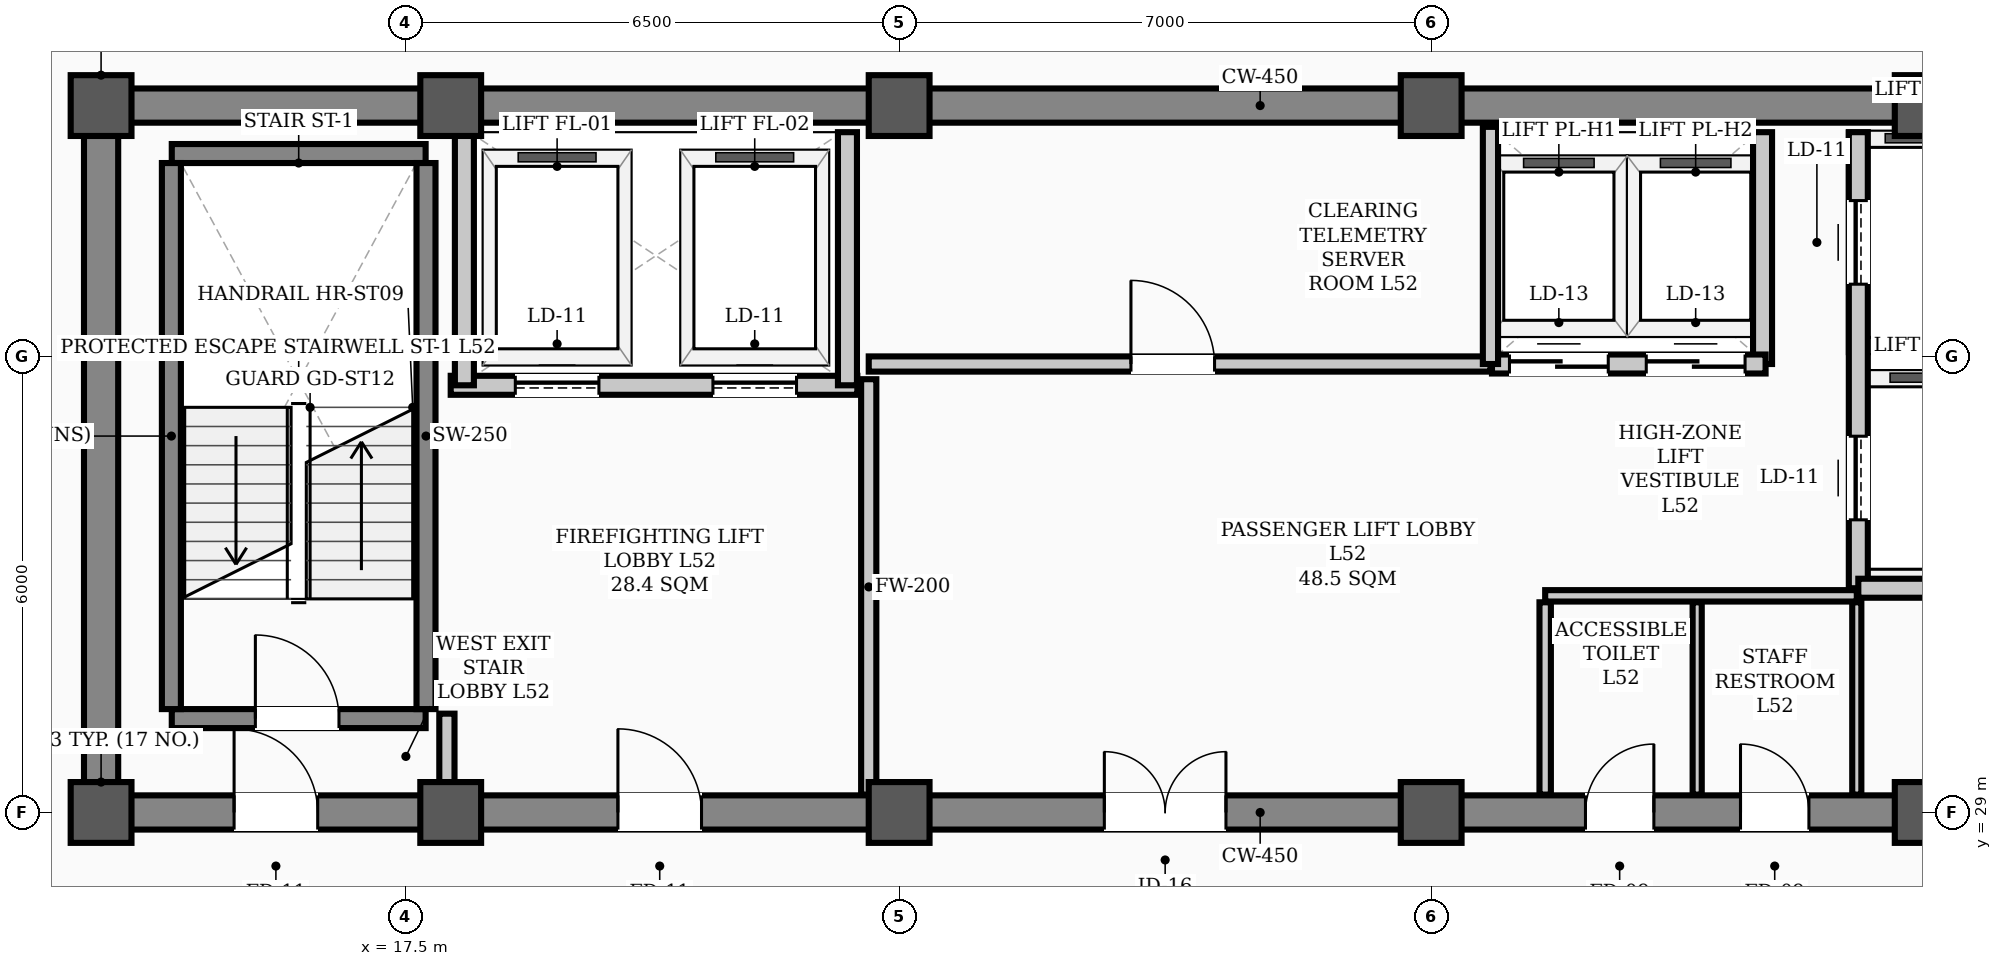
"""IFC4 building model, lengths in metres.
Left out: names, types, materials, properties, quantities, classifications, styles, units other than length and angle.
Written with IfcOpenShell. Run it as: python <this file> out.ifc"""

import sys

from ifc_helpers import new_model, si_unit, direction, frame, frame_2d, origin, origin_2d, place, context, subcontext, project, spatial, rectangle, hollow_rectangle, extrude, element, fill, save


model = new_model("IFC4")
c1 = context("Model", 3, precision=1e-05, world=origin(), true_north=direction((0.0, 1.0)))
c2 = subcontext(c1, "Body", "Model", "MODEL_VIEW")
j1 = project(units=[si_unit("LENGTHUNIT", "METRE"), si_unit("PLANEANGLEUNIT", "RADIAN")], contexts=[c1])
p1 = place(None, origin())
s1 = spatial("IfcSite", under=j1, at=p1, CompositionType="ELEMENT")
p2 = place(p1, origin())
s2 = spatial("IfcBuilding", under=s1, at=p2, CompositionType="ELEMENT")
p3 = place(p2, frame((0.0, 0.0, 211.1)))
s3 = spatial("IfcBuildingStorey", under=s2, at=p3, CompositionType="ELEMENT", Elevation=211.1)
for number, where, z_axis, x_axis in (
    (1, (13.5, 29.0, 0.0), (0.0, 0.0, 1.0), (1.0, 0.0, 0.0)),
    (2, (13.5, 38.3, 0.0), (0.0, 0.0, 1.0), (1.0, 0.0, 0.0)),
    (3, (18.1, 29.0, 0.0), (0.0, 0.0, 1.0), (1.0, 0.0, 0.0)),
    (4, (18.1, 38.3, 0.0), (0.0, 0.0, 1.0), (1.0, 0.0, 0.0)),
    (5, (24.0, 29.0, 0.0), (0.0, 0.0, 1.0), (1.0, 0.0, 0.0)),
    (6, (24.0, 38.3, 0.0), (0.0, 0.0, 1.0), (1.0, 0.0, 0.0)),
    (7, (31.0, 29.0, 0.0), (0.0, 0.0, 1.0), (1.0, 0.0, 0.0)),
    (8, (31.0, 38.3, 0.0), (0.0, 0.0, 1.0), (1.0, 0.0, 0.0)),
    (9, (37.5, 29.0, 0.0), (0.0, 0.0, 1.0), (1.0, 0.0, 0.0)),
    (10, (37.5, 38.3, 0.0), (0.0, 0.0, 1.0), (1.0, 0.0, 0.0)),
):
    element("IfcColumn", number, at=place(p3, frame(where, z_axis=z_axis, x_axis=x_axis)), inside=s3, PredefinedType="COLUMN", context=c2, shape_type="SweptSolid", body=[
        extrude(hollow_rectangle(XDim=0.8, YDim=0.8, WallThickness=0.032, InnerFilletRadius=0.016, OuterFilletRadius=0.048, at=origin_2d()), origin(), (0.0, 0.0, 1.0), 3.9),
    ])
p4 = place(p3, frame((13.5, 29.0, 0.0), z_axis=(0.0, 0.0, 1.0), x_axis=(1.0, 0.0, 0.0)))
e11 = element("IfcWall", 11, at=p4, inside=s3, PredefinedType="SHEAR", context=c2, shape_type="SweptSolid", body=[
    extrude(rectangle(XDim=30.5, YDim=0.45, at=frame_2d((15.25, 0.0))), origin(), (0.0, 0.0, 1.0), 3.72),
])
p5 = place(p4, frame((1.75, 0.0, 0.0)))
e12 = element("IfcOpeningElement", 12, at=p5, cuts=e11, PredefinedType="OPENING", context=c2, shape_type="SweptSolid", body=[
    extrude(rectangle(XDim=1.1, YDim=2.08, at=frame_2d((0.55, 1.04))), frame((0.0, 0.235, 0.0), z_axis=(0.0, -1.0, 0.0), x_axis=(1.0, 0.0, 0.0)), (0.0, 0.0, 1.0), 0.47),
])
p6 = place(p4, frame((26.7, 0.0, 0.0)))
e13 = element("IfcOpeningElement", 13, at=p6, cuts=e11, PredefinedType="OPENING", context=c2, shape_type="SweptSolid", body=[
    extrude(rectangle(XDim=1.1, YDim=2.08, at=frame_2d((0.55, 1.04))), frame((0.0, 0.235, 0.0), z_axis=(0.0, -1.0, 0.0), x_axis=(1.0, 0.0, 0.0)), (0.0, 0.0, 1.0), 0.47),
])
p7 = place(p4, frame((6.8, 0.0, 0.0)))
e14 = element("IfcOpeningElement", 14, at=p7, cuts=e11, PredefinedType="OPENING", context=c2, shape_type="SweptSolid", body=[
    extrude(rectangle(XDim=1.1, YDim=2.08, at=frame_2d((0.55, 1.04))), frame((0.0, 0.235, 0.0), z_axis=(0.0, -1.0, 0.0), x_axis=(1.0, 0.0, 0.0)), (0.0, 0.0, 1.0), 0.47),
])
p8 = place(p4, frame((13.2, 0.0, 0.0)))
e15 = element("IfcOpeningElement", 15, at=p8, cuts=e11, PredefinedType="OPENING", context=c2, shape_type="SweptSolid", body=[
    extrude(rectangle(XDim=1.6, YDim=2.08, at=frame_2d((0.8, 1.04))), frame((0.0, 0.235, 0.0), z_axis=(0.0, -1.0, 0.0), x_axis=(1.0, 0.0, 0.0)), (0.0, 0.0, 1.0), 0.47),
])
p9 = place(p4, frame((19.53, 0.0, 0.0)))
e16 = element("IfcOpeningElement", 16, at=p9, cuts=e11, PredefinedType="OPENING", context=c2, shape_type="SweptSolid", body=[
    extrude(rectangle(XDim=0.9, YDim=2.08, at=frame_2d((0.45, 1.04))), frame((0.0, 0.235, 0.0), z_axis=(0.0, -1.0, 0.0), x_axis=(1.0, 0.0, 0.0)), (0.0, 0.0, 1.0), 0.47),
])
p10 = place(p4, frame((21.57, 0.0, 0.0)))
e17 = element("IfcOpeningElement", 17, at=p10, cuts=e11, PredefinedType="OPENING", context=c2, shape_type="SweptSolid", body=[
    extrude(rectangle(XDim=0.9, YDim=2.08, at=frame_2d((0.45, 1.04))), frame((0.0, 0.235, 0.0), z_axis=(0.0, -1.0, 0.0), x_axis=(1.0, 0.0, 0.0)), (0.0, 0.0, 1.0), 0.47),
])
p11 = place(p3, frame((13.5, 38.3, 0.0), z_axis=(0.0, 0.0, 1.0), x_axis=(1.0, 0.0, 0.0)))
e18 = element("IfcWall", 18, at=p11, inside=s3, PredefinedType="SHEAR", context=c2, shape_type="SweptSolid", body=[
    extrude(rectangle(XDim=30.5, YDim=0.45, at=frame_2d((15.25, 0.0))), origin(), (0.0, 0.0, 1.0), 3.72),
])
p12 = place(p3, frame((13.5, 29.35, 0.0), z_axis=(0.0, 0.0, 1.0), x_axis=(0.0, 1.0, 0.0)))
e19 = element("IfcWall", 19, at=p12, inside=s3, PredefinedType="SHEAR", context=c2, shape_type="SweptSolid", body=[
    extrude(rectangle(XDim=8.6, YDim=0.45, at=frame_2d((4.3, 0.0))), origin(), (0.0, 0.0, 1.0), 3.72),
])
p13 = place(p3, frame((14.43, 30.235, 0.0), z_axis=(0.0, 0.0, 1.0), x_axis=(1.0, 0.0, 0.0)))
e20 = element("IfcWall", 20, at=p13, inside=s3, PredefinedType="STANDARD", context=c2, shape_type="SweptSolid", body=[
    extrude(rectangle(XDim=3.34, YDim=0.25, at=frame_2d((1.67, 0.0))), origin(), (0.0, 0.0, 1.0), 3.72),
])
p14 = place(p13, frame((1.1, 0.0, 0.0)))
e21 = element("IfcOpeningElement", 21, at=p14, cuts=e20, PredefinedType="OPENING", context=c2, shape_type="SweptSolid", body=[
    extrude(rectangle(XDim=1.1, YDim=2.08, at=frame_2d((0.55, 1.04))), frame((0.0, 0.135, 0.0), z_axis=(0.0, -1.0, 0.0), x_axis=(1.0, 0.0, 0.0)), (0.0, 0.0, 1.0), 0.27),
])
p15 = place(p3, frame((14.43, 37.669, 0.0), z_axis=(0.0, 0.0, 1.0), x_axis=(1.0, 0.0, 0.0)))
e22 = element("IfcWall", 22, at=p15, inside=s3, PredefinedType="STANDARD", context=c2, shape_type="SweptSolid", body=[
    extrude(rectangle(XDim=3.34, YDim=0.25, at=frame_2d((1.67, 0.0))), origin(), (0.0, 0.0, 1.0), 3.72),
])
for number, where, z_axis, x_axis in (
    (23, (14.425, 30.36, 0.0), (0.0, 0.0, 1.0), (0.0, 1.0, 0.0)),
    (24, (17.775, 30.36, 0.0), (0.0, 0.0, 1.0), (0.0, 1.0, 0.0)),
):
    element("IfcWall", number, at=place(p3, frame(where, z_axis=z_axis, x_axis=x_axis)), inside=s3, PredefinedType="STANDARD", context=c2, shape_type="SweptSolid", body=[
        extrude(rectangle(XDim=7.184, YDim=0.25, at=frame_2d((3.592, 0.0))), origin(), (0.0, 0.0, 1.0), 3.72),
    ])
p16 = place(p3, frame((18.1, 34.62, 0.0), z_axis=(0.0, 0.0, 1.0), x_axis=(1.0, 0.0, 0.0)))
e25 = element("IfcWall", 25, at=p16, inside=s3, PredefinedType="STANDARD", context=c2, shape_type="SweptSolid", body=[
    extrude(rectangle(XDim=5.35, YDim=0.25, at=frame_2d((2.675, 0.0))), origin(), (0.0, 0.0, 1.0), 3.72),
])
p17 = place(p16, frame((0.85, 0.0, 0.0)))
e26 = element("IfcOpeningElement", 26, at=p17, cuts=e25, PredefinedType="OPENING", context=c2, shape_type="SweptSolid", body=[
    extrude(rectangle(XDim=1.1, YDim=2.08, at=frame_2d((0.55, 1.04))), frame((0.0, 0.135, 0.0), z_axis=(0.0, -1.0, 0.0), x_axis=(1.0, 0.0, 0.0)), (0.0, 0.0, 1.0), 0.27),
])
p18 = place(p16, frame((3.45, 0.0, 0.0)))
e27 = element("IfcOpeningElement", 27, at=p18, cuts=e25, PredefinedType="OPENING", context=c2, shape_type="SweptSolid", body=[
    extrude(rectangle(XDim=1.1, YDim=2.08, at=frame_2d((0.55, 1.04))), frame((0.0, 0.135, 0.0), z_axis=(0.0, -1.0, 0.0), x_axis=(1.0, 0.0, 0.0)), (0.0, 0.0, 1.0), 0.27),
])
p19 = place(p3, frame((36.62, 31.95, 0.0), z_axis=(0.0, 0.0, 1.0), x_axis=(0.0, 1.0, 0.0)))
e28 = element("IfcWall", 28, at=p19, inside=s3, PredefinedType="STANDARD", context=c2, shape_type="SweptSolid", body=[
    extrude(rectangle(XDim=6.0, YDim=0.25, at=frame_2d((3.0, 0.0))), origin(), (0.0, 0.0, 1.0), 3.72),
])
p20 = place(p19, frame((0.9, 0.0, 0.0)))
e29 = element("IfcOpeningElement", 29, at=p20, cuts=e28, PredefinedType="OPENING", context=c2, shape_type="SweptSolid", body=[
    extrude(rectangle(XDim=1.1, YDim=2.08, at=frame_2d((0.55, 1.04))), frame((0.0, 0.135, 0.0), z_axis=(0.0, -1.0, 0.0), x_axis=(1.0, 0.0, 0.0)), (0.0, 0.0, 1.0), 0.27),
])
p21 = place(p19, frame((4.0, 0.0, 0.0)))
e30 = element("IfcOpeningElement", 30, at=p21, cuts=e28, PredefinedType="OPENING", context=c2, shape_type="SweptSolid", body=[
    extrude(rectangle(XDim=1.1, YDim=2.08, at=frame_2d((0.55, 1.04))), frame((0.0, 0.135, 0.0), z_axis=(0.0, -1.0, 0.0), x_axis=(1.0, 0.0, 0.0)), (0.0, 0.0, 1.0), 0.27),
])
p22 = place(p3, frame((36.62, 31.95, 0.0), z_axis=(0.0, 0.0, 1.0), x_axis=(1.0, 0.0, 0.0)))
e31 = element("IfcWall", 31, at=p22, inside=s3, PredefinedType="STANDARD", context=c2, shape_type="SweptSolid", body=[
    extrude(rectangle(XDim=1.9, YDim=0.25, at=frame_2d((0.95, 0.0))), origin(), (0.0, 0.0, 1.0), 3.48),
])
for number, where, z_axis, x_axis in (
    (32, (18.28, 34.62, 0.0), (0.0, 0.0, 1.0), (0.0, 1.0, 0.0)),
    (33, (23.32, 34.62, 0.0), (0.0, 0.0, 1.0), (0.0, 1.0, 0.0)),
):
    element("IfcWall", number, at=place(p3, frame(where, z_axis=z_axis, x_axis=x_axis)), inside=s3, PredefinedType="STANDARD", context=c2, shape_type="SweptSolid", body=[
        extrude(rectangle(XDim=3.33, YDim=0.25, at=frame_2d((1.665, 0.0))), origin(), (0.0, 0.0, 1.0), 3.72),
    ])
p23 = place(p3, frame((35.36, 34.9, 0.0), z_axis=(0.0, 0.0, 1.0), x_axis=(0.0, 1.0, 0.0)))
e34 = element("IfcWall", 34, at=p23, inside=s3, PredefinedType="STANDARD", context=c2, shape_type="SweptSolid", body=[
    extrude(rectangle(XDim=3.05, YDim=0.25, at=frame_2d((1.525, 0.0))), origin(), (0.0, 0.0, 1.0), 3.72),
])
p24 = place(p3, frame((31.8, 34.9, 0.0), z_axis=(0.0, 0.0, 1.0), x_axis=(1.0, 0.0, 0.0)))
e35 = element("IfcWall", 35, at=p24, inside=s3, PredefinedType="STANDARD", context=c2, shape_type="SweptSolid", body=[
    extrude(rectangle(XDim=3.6, YDim=0.25, at=frame_2d((1.8, 0.0))), origin(), (0.0, 0.0, 1.0), 3.72),
])
p25 = place(p24, frame((0.23, 0.0, 0.0)))
e36 = element("IfcOpeningElement", 36, at=p25, cuts=e35, PredefinedType="OPENING", context=c2, shape_type="SweptSolid", body=[
    extrude(rectangle(XDim=1.3, YDim=2.08, at=frame_2d((0.65, 1.04))), frame((0.0, 0.135, 0.0), z_axis=(0.0, -1.0, 0.0), x_axis=(1.0, 0.0, 0.0)), (0.0, 0.0, 1.0), 0.27),
])
p26 = place(p24, frame((2.03, 0.0, 0.0)))
e37 = element("IfcOpeningElement", 37, at=p26, cuts=e35, PredefinedType="OPENING", context=c2, shape_type="SweptSolid", body=[
    extrude(rectangle(XDim=1.3, YDim=2.08, at=frame_2d((0.65, 1.04))), frame((0.0, 0.135, 0.0), z_axis=(0.0, -1.0, 0.0), x_axis=(1.0, 0.0, 0.0)), (0.0, 0.0, 1.0), 0.27),
])
p27 = place(p3, frame((23.6, 34.9, 0.0), z_axis=(0.0, 0.0, 1.0), x_axis=(1.0, 0.0, 0.0)))
e38 = element("IfcWall", 38, at=p27, inside=s3, PredefinedType="STANDARD", context=c2, shape_type="SweptSolid", body=[
    extrude(rectangle(XDim=8.18, YDim=0.2, at=frame_2d((4.09, 0.0))), origin(), (0.0, 0.0, 1.0), 3.72),
])
p28 = place(p27, frame((3.45, 0.0, 0.0)))
e39 = element("IfcOpeningElement", 39, at=p28, cuts=e38, PredefinedType="OPENING", context=c2, shape_type="SweptSolid", body=[
    extrude(rectangle(XDim=1.1, YDim=2.08, at=frame_2d((0.55, 1.04))), frame((0.0, 0.11, 0.0), z_axis=(0.0, -1.0, 0.0), x_axis=(1.0, 0.0, 0.0)), (0.0, 0.0, 1.0), 0.22),
])
p29 = place(p3, frame((32.5, 31.85, 0.0), z_axis=(0.0, 0.0, 1.0), x_axis=(1.0, 0.0, 0.0)))
e40 = element("IfcWall", 40, at=p29, inside=s3, PredefinedType="PARTITIONING", context=c2, shape_type="SweptSolid", body=[
    extrude(rectangle(XDim=4.1, YDim=0.15, at=frame_2d((2.05, 0.0))), origin(), (0.0, 0.0, 1.0), 3.72),
])
p30 = place(p3, frame((18.05, 29.235, 0.0), z_axis=(0.0, 0.0, 1.0), x_axis=(0.0, 1.0, 0.0)))
e41 = element("IfcWall", 41, at=p30, inside=s3, PredefinedType="STANDARD", context=c2, shape_type="SweptSolid", body=[
    extrude(rectangle(XDim=1.065, YDim=0.2, at=frame_2d((0.532, 0.0))), origin(), (0.0, 0.0, 1.0), 3.35),
])
p31 = place(p3, frame((23.6, 29.235, 0.0), z_axis=(0.0, 0.0, 1.0), x_axis=(0.0, 1.0, 0.0)))
e42 = element("IfcWall", 42, at=p31, inside=s3, PredefinedType="STANDARD", context=c2, shape_type="SweptSolid", body=[
    extrude(rectangle(XDim=5.465, YDim=0.2, at=frame_2d((2.732, 0.0))), origin(), (0.0, 0.0, 1.0), 3.2),
])
p32 = place(p3, frame((32.5, 29.235, 0.0), z_axis=(0.0, 0.0, 1.0), x_axis=(0.0, 1.0, 0.0)))
e43 = element("IfcWall", 43, at=p32, inside=s3, PredefinedType="PARTITIONING", context=c2, shape_type="SweptSolid", body=[
    extrude(rectangle(XDim=2.53, YDim=0.15, at=frame_2d((1.265, 0.0))), origin(), (0.0, 0.0, 1.0), 3.35),
])
for number, where, z_axis, x_axis in (
    (44, (36.6, 29.235, 0.0), (0.0, 0.0, 1.0), (0.0, 1.0, 0.0)),
    (45, (34.5, 29.235, 0.0), (0.0, 0.0, 1.0), (0.0, 1.0, 0.0)),
):
    element("IfcWall", number, at=place(p3, frame(where, z_axis=z_axis, x_axis=x_axis)), inside=s3, PredefinedType="PARTITIONING", context=c2, shape_type="SweptSolid", body=[
        extrude(rectangle(XDim=2.53, YDim=0.12, at=frame_2d((1.265, 0.0))), origin(), (0.0, 0.0, 1.0), 3.35),
    ])
p33 = place(p3, frame((31.78, 34.9, 0.0), z_axis=(0.0, 0.0, 1.0), x_axis=(0.0, 1.0, 0.0)))
e46 = element("IfcWall", 46, at=p33, inside=s3, PredefinedType="STANDARD", context=c2, shape_type="SweptSolid", body=[
    extrude(rectangle(XDim=3.12, YDim=0.2, at=frame_2d((1.56, 0.0))), origin(), (0.0, 0.0, 1.0), 3.72),
])
p34 = place(p14, origin())
e47 = element("IfcDoor", 47, at=p34, inside=s3, OperationType="SINGLE_SWING_LEFT", PredefinedType="DOOR", context=c2, shape_type="SweptSolid", body=[
    extrude(rectangle(XDim=1.1, YDim=2.08, at=frame_2d((0.55, 1.04))), frame((0.0, 0.025, 0.0), z_axis=(0.0, -1.0, 0.0), x_axis=(1.0, 0.0, 0.0)), (0.0, 0.0, 1.0), 0.05),
])
fill(e21, e47)
p35 = place(p5, origin())
e48 = element("IfcDoor", 48, at=p35, inside=s3, OperationType="SINGLE_SWING_LEFT", PredefinedType="DOOR", context=c2, shape_type="SweptSolid", body=[
    extrude(rectangle(XDim=1.1, YDim=2.08, at=frame_2d((0.55, 1.04))), frame((0.0, 0.025, 0.0), z_axis=(0.0, -1.0, 0.0), x_axis=(1.0, 0.0, 0.0)), (0.0, 0.0, 1.0), 0.05),
])
fill(e12, e48)
p36 = place(p7, origin())
e49 = element("IfcDoor", 49, at=p36, inside=s3, OperationType="SINGLE_SWING_LEFT", PredefinedType="DOOR", context=c2, shape_type="SweptSolid", body=[
    extrude(rectangle(XDim=1.1, YDim=2.08, at=frame_2d((0.55, 1.04))), frame((0.0, 0.025, 0.0), z_axis=(0.0, -1.0, 0.0), x_axis=(1.0, 0.0, 0.0)), (0.0, 0.0, 1.0), 0.05),
])
fill(e14, e49)
p37 = place(p8, origin())
e50 = element("IfcDoor", 50, at=p37, inside=s3, OperationType="DOUBLE_DOOR_SINGLE_SWING", PredefinedType="DOOR", context=c2, shape_type="SweptSolid", body=[
    extrude(rectangle(XDim=1.6, YDim=2.08, at=frame_2d((0.8, 1.04))), frame((0.0, 0.025, 0.0), z_axis=(0.0, -1.0, 0.0), x_axis=(1.0, 0.0, 0.0)), (0.0, 0.0, 1.0), 0.05),
])
fill(e15, e50)
p38 = place(p28, origin())
e51 = element("IfcDoor", 51, at=p38, inside=s3, OperationType="SINGLE_SWING_LEFT", PredefinedType="DOOR", context=c2, shape_type="SweptSolid", body=[
    extrude(rectangle(XDim=1.1, YDim=2.08, at=frame_2d((0.55, 1.04))), frame((0.0, 0.025, 0.0), z_axis=(0.0, -1.0, 0.0), x_axis=(1.0, 0.0, 0.0)), (0.0, 0.0, 1.0), 0.05),
])
fill(e39, e51)
p39 = place(p9, origin())
e52 = element("IfcDoor", 52, at=p39, inside=s3, OperationType="SINGLE_SWING_RIGHT", PredefinedType="DOOR", context=c2, shape_type="SweptSolid", body=[
    extrude(rectangle(XDim=0.9, YDim=2.08, at=frame_2d((0.45, 1.04))), frame((0.0, 0.025, 0.0), z_axis=(0.0, -1.0, 0.0), x_axis=(1.0, 0.0, 0.0)), (0.0, 0.0, 1.0), 0.05),
])
fill(e16, e52)
p40 = place(p10, origin())
e53 = element("IfcDoor", 53, at=p40, inside=s3, OperationType="SINGLE_SWING_LEFT", PredefinedType="DOOR", context=c2, shape_type="SweptSolid", body=[
    extrude(rectangle(XDim=0.9, YDim=2.08, at=frame_2d((0.45, 1.04))), frame((0.0, 0.025, 0.0), z_axis=(0.0, -1.0, 0.0), x_axis=(1.0, 0.0, 0.0)), (0.0, 0.0, 1.0), 0.05),
])
fill(e17, e53)
p41 = place(p17, origin())
e54 = element("IfcDoor", 54, at=p41, inside=s3, OperationType="SLIDING_TO_LEFT", PredefinedType="DOOR", context=c2, shape_type="SweptSolid", body=[
    extrude(rectangle(XDim=1.1, YDim=2.08, at=frame_2d((0.55, 1.04))), frame((0.0, 0.025, 0.0), z_axis=(0.0, -1.0, 0.0), x_axis=(1.0, 0.0, 0.0)), (0.0, 0.0, 1.0), 0.05),
])
fill(e26, e54)
p42 = place(p18, origin())
e55 = element("IfcDoor", 55, at=p42, inside=s3, OperationType="SLIDING_TO_LEFT", PredefinedType="DOOR", context=c2, shape_type="SweptSolid", body=[
    extrude(rectangle(XDim=1.1, YDim=2.08, at=frame_2d((0.55, 1.04))), frame((0.0, 0.025, 0.0), z_axis=(0.0, -1.0, 0.0), x_axis=(1.0, 0.0, 0.0)), (0.0, 0.0, 1.0), 0.05),
])
fill(e27, e55)
p43 = place(p20, origin())
e56 = element("IfcDoor", 56, at=p43, inside=s3, OperationType="SLIDING_TO_LEFT", PredefinedType="DOOR", context=c2, shape_type="SweptSolid", body=[
    extrude(rectangle(XDim=1.1, YDim=2.08, at=frame_2d((0.55, 1.04))), frame((0.0, 0.025, 0.0), z_axis=(0.0, -1.0, 0.0), x_axis=(1.0, 0.0, 0.0)), (0.0, 0.0, 1.0), 0.05),
])
fill(e29, e56)
p44 = place(p21, origin())
e57 = element("IfcDoor", 57, at=p44, inside=s3, OperationType="SLIDING_TO_LEFT", PredefinedType="DOOR", context=c2, shape_type="SweptSolid", body=[
    extrude(rectangle(XDim=1.1, YDim=2.08, at=frame_2d((0.55, 1.04))), frame((0.0, 0.025, 0.0), z_axis=(0.0, -1.0, 0.0), x_axis=(1.0, 0.0, 0.0)), (0.0, 0.0, 1.0), 0.05),
])
fill(e30, e57)
p45 = place(p25, origin())
e58 = element("IfcDoor", 58, at=p45, inside=s3, OperationType="DOUBLE_DOOR_SLIDING", PredefinedType="DOOR", context=c2, shape_type="SweptSolid", body=[
    extrude(rectangle(XDim=1.3, YDim=2.08, at=frame_2d((0.65, 1.04))), frame((0.0, 0.025, 0.0), z_axis=(0.0, -1.0, 0.0), x_axis=(1.0, 0.0, 0.0)), (0.0, 0.0, 1.0), 0.05),
])
fill(e36, e58)
p46 = place(p26, origin())
e59 = element("IfcDoor", 59, at=p46, inside=s3, OperationType="DOUBLE_DOOR_SLIDING", PredefinedType="DOOR", context=c2, shape_type="SweptSolid", body=[
    extrude(rectangle(XDim=1.3, YDim=2.08, at=frame_2d((0.65, 1.04))), frame((0.0, 0.025, 0.0), z_axis=(0.0, -1.0, 0.0), x_axis=(1.0, 0.0, 0.0)), (0.0, 0.0, 1.0), 0.05),
])
fill(e37, e59)
save(model, sys.argv[1])
